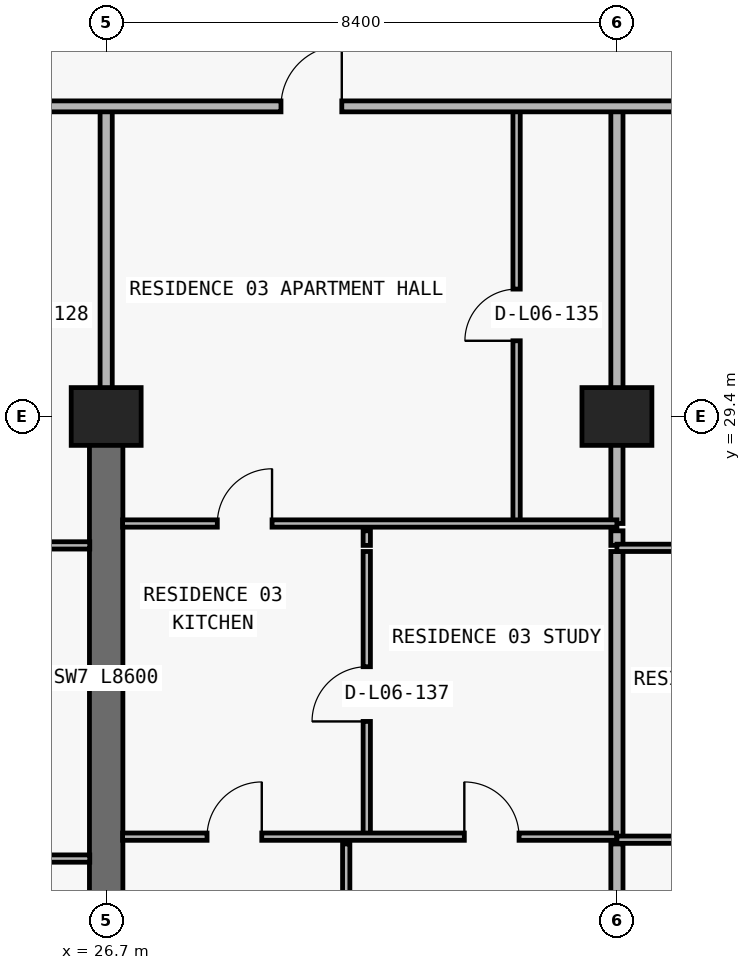
"""IFC4 building model, lengths in metres.
Left out: names, types, materials, properties, quantities, classifications, styles, units other than length and angle.
Written with IfcOpenShell. Run it as: python <this file> out.ifc"""

import sys

from ifc_helpers import new_model, si_unit, direction, frame, frame_2d, origin, origin_2d, place, context, subcontext, project, spatial, rectangle, extrude, element, fill, save


model = new_model("IFC4")
c1 = context("Model", 3, precision=1e-05, world=origin(), true_north=direction((0.0, 1.0)))
c2 = subcontext(c1, "Body", "Model", "MODEL_VIEW")
j1 = project(units=[si_unit("LENGTHUNIT", "METRE"), si_unit("PLANEANGLEUNIT", "RADIAN")], contexts=[c1])
p1 = place(None, origin())
s1 = spatial("IfcSite", under=j1, at=p1, CompositionType="ELEMENT")
p2 = place(p1, origin())
s2 = spatial("IfcBuilding", under=s1, at=p2, CompositionType="ELEMENT")
p3 = place(p2, frame((0.0, 0.0, 30.0)))
s3 = spatial("IfcBuildingStorey", under=s2, at=p3, CompositionType="ELEMENT", Elevation=30.0)
for number, where, z_axis, x_axis in (
    (1, (26.7, 29.4, 0.0), (0.0, 0.0, 1.0), (1.0, 0.0, 0.0)),
    (2, (35.1, 29.4, 0.0), (0.0, 0.0, 1.0), (1.0, 0.0, 0.0)),
):
    element("IfcColumn", number, at=place(p3, frame(where, z_axis=z_axis, x_axis=x_axis)), inside=s3, PredefinedType="COLUMN", context=c2, shape_type="SweptSolid", body=[
        extrude(rectangle(XDim=1.15, YDim=0.95, at=origin_2d()), origin(), (0.0, 0.0, 1.0), 3.05),
    ])
p4 = place(p3, frame((26.7, 20.8, 0.0), z_axis=(0.0, 0.0, 1.0), x_axis=(0.0, 1.0, 0.0)))
e3 = element("IfcWall", 3, at=p4, inside=s3, PredefinedType="SHEAR", context=c2, shape_type="SweptSolid", body=[
    extrude(rectangle(XDim=8.6, YDim=0.55, at=frame_2d((4.3, 0.0))), origin(), (0.0, 0.0, 1.0), 3.05),
])
p5 = place(p3, frame((26.7, 29.405, 0.0), z_axis=(0.0, 0.0, 1.0), x_axis=(0.0, 1.0, 0.0)))
e4 = element("IfcWall", 4, at=p5, inside=s3, PredefinedType="PARTITIONING", context=c2, shape_type="SweptSolid", body=[
    extrude(rectangle(XDim=5.095, YDim=0.2, at=frame_2d((2.547, 0.0))), origin(), (0.0, 0.0, 1.0), 2.335),
])
p6 = place(p3, frame((30.648, 6.24, 0.0), z_axis=(0.0, 0.0, 1.0), x_axis=(0.0, 1.0, 0.0)))
e5 = element("IfcWall", 5, at=p6, inside=s3, PredefinedType="PARTITIONING", context=c2, shape_type="SweptSolid", body=[
    extrude(rectangle(XDim=16.13, YDim=0.12, at=frame_2d((8.065, 0.0))), origin(), (0.0, 0.0, 1.0), 3.05),
])
p7 = place(p3, frame((30.986, 22.49, 0.0), z_axis=(0.0, 0.0, 1.0), x_axis=(0.0, 1.0, 0.0)))
e6 = element("IfcWall", 6, at=p7, inside=s3, PredefinedType="PARTITIONING", context=c2, shape_type="SweptSolid", body=[
    extrude(rectangle(XDim=4.69, YDim=0.12, at=frame_2d((2.345, 0.0))), origin(), (0.0, 0.0, 1.0), 3.05),
])
p8 = place(p7, frame((1.895, 0.0, 0.0)))
e7 = element("IfcOpeningElement", 7, at=p8, cuts=e6, PredefinedType="OPENING", context=c2, shape_type="SweptSolid", body=[
    extrude(rectangle(XDim=0.9, YDim=2.15, at=frame_2d((0.45, 1.075))), frame((0.0, 0.07, 0.0), z_axis=(0.0, -1.0, 0.0), x_axis=(1.0, 0.0, 0.0)), (0.0, 0.0, 1.0), 0.14),
])
p9 = place(p3, frame((30.986, 27.28, 0.0), z_axis=(0.0, 0.0, 1.0), x_axis=(0.0, 1.0, 0.0)))
e8 = element("IfcWall", 8, at=p9, inside=s3, PredefinedType="PARTITIONING", context=c2, shape_type="SweptSolid", body=[
    extrude(rectangle(XDim=0.24, YDim=0.12, at=frame_2d((0.12, 0.0))), origin(), (0.0, 0.0, 1.0), 3.05),
])
p10 = place(p3, frame((33.45, 27.64, 0.0), z_axis=(0.0, 0.0, 1.0), x_axis=(0.0, 1.0, 0.0)))
e9 = element("IfcWall", 9, at=p10, inside=s3, PredefinedType="PARTITIONING", context=c2, shape_type="SweptSolid", body=[
    extrude(rectangle(XDim=6.86, YDim=0.12, at=frame_2d((3.43, 0.0))), origin(), (0.0, 0.0, 1.0), 3.05),
])
p11 = place(p10, frame((3.005, 0.0, 0.0)))
e10 = element("IfcOpeningElement", 10, at=p11, cuts=e9, PredefinedType="OPENING", context=c2, shape_type="SweptSolid", body=[
    extrude(rectangle(XDim=0.85, YDim=2.1, at=frame_2d((0.425, 1.05))), frame((0.0, 0.07, 0.0), z_axis=(0.0, -1.0, 0.0), x_axis=(1.0, 0.0, 0.0)), (0.0, 0.0, 1.0), 0.14),
])
p12 = place(p3, frame((35.1, 6.24, 0.0), z_axis=(0.0, 0.0, 1.0), x_axis=(0.0, 1.0, 0.0)))
e11 = element("IfcWall", 11, at=p12, inside=s3, PredefinedType="PARTITIONING", context=c2, shape_type="SweptSolid", body=[
    extrude(rectangle(XDim=16.13, YDim=0.2, at=frame_2d((8.065, 0.0))), origin(), (0.0, 0.0, 1.0), 2.11),
])
p13 = place(p3, frame((35.1, 22.49, 0.0), z_axis=(0.0, 0.0, 1.0), x_axis=(0.0, 1.0, 0.0)))
e12 = element("IfcWall", 12, at=p13, inside=s3, PredefinedType="PARTITIONING", context=c2, shape_type="SweptSolid", body=[
    extrude(rectangle(XDim=4.69, YDim=0.2, at=frame_2d((2.345, 0.0))), origin(), (0.0, 0.0, 1.0), 2.11),
])
p14 = place(p3, frame((35.1, 27.28, 0.0), z_axis=(0.0, 0.0, 1.0), x_axis=(0.0, 1.0, 0.0)))
e13 = element("IfcWall", 13, at=p14, inside=s3, PredefinedType="PARTITIONING", context=c2, shape_type="SweptSolid", body=[
    extrude(rectangle(XDim=0.24, YDim=0.2, at=frame_2d((0.12, 0.0))), origin(), (0.0, 0.0, 1.0), 2.11),
])
p15 = place(p3, frame((35.1, 27.64, 0.0), z_axis=(0.0, 0.0, 1.0), x_axis=(0.0, 1.0, 0.0)))
e14 = element("IfcWall", 14, at=p15, inside=s3, PredefinedType="PARTITIONING", context=c2, shape_type="SweptSolid", body=[
    extrude(rectangle(XDim=6.86, YDim=0.2, at=frame_2d((3.43, 0.0))), origin(), (0.0, 0.0, 1.0), 2.11),
])
p16 = place(p3, frame((18.3, 22.13, 0.0), z_axis=(0.0, 0.0, 1.0), x_axis=(1.0, 0.0, 0.0)))
e15 = element("IfcWall", 15, at=p16, inside=s3, PredefinedType="PARTITIONING", context=c2, shape_type="SweptSolid", body=[
    extrude(rectangle(XDim=8.13, YDim=0.12, at=frame_2d((4.065, 0.0))), origin(), (0.0, 0.0, 1.0), 3.05),
])
p17 = place(p16, frame((1.86, 0.0, 0.0)))
e16 = element("IfcOpeningElement", 16, at=p17, cuts=e15, PredefinedType="OPENING", context=c2, shape_type="SweptSolid", body=[
    extrude(rectangle(XDim=0.9, YDim=2.15, at=frame_2d((0.45, 1.075))), frame((0.0, 0.07, 0.0), z_axis=(0.0, -1.0, 0.0), x_axis=(1.0, 0.0, 0.0)), (0.0, 0.0, 1.0), 0.14),
])
p18 = place(p16, frame((6.008, 0.0, 0.0)))
e17 = element("IfcOpeningElement", 17, at=p18, cuts=e15, PredefinedType="OPENING", context=c2, shape_type="SweptSolid", body=[
    extrude(rectangle(XDim=0.9, YDim=2.15, at=frame_2d((0.45, 1.075))), frame((0.0, 0.07, 0.0), z_axis=(0.0, -1.0, 0.0), x_axis=(1.0, 0.0, 0.0)), (0.0, 0.0, 1.0), 0.14),
])
p19 = place(p3, frame((35.1, 22.44, 0.0), z_axis=(0.0, 0.0, 1.0), x_axis=(1.0, 0.0, 0.0)))
e18 = element("IfcWall", 18, at=p19, inside=s3, PredefinedType="PARTITIONING", context=c2, shape_type="SweptSolid", body=[
    extrude(rectangle(XDim=7.6, YDim=0.12, at=frame_2d((3.8, 0.0))), origin(), (0.0, 0.0, 1.0), 3.05),
])
p20 = place(p19, frame((3.35, 0.0, 0.0)))
e19 = element("IfcOpeningElement", 19, at=p20, cuts=e18, PredefinedType="OPENING", context=c2, shape_type="SweptSolid", body=[
    extrude(rectangle(XDim=0.9, YDim=2.15, at=frame_2d((0.45, 1.075))), frame((0.0, 0.07, 0.0), z_axis=(0.0, -1.0, 0.0), x_axis=(1.0, 0.0, 0.0)), (0.0, 0.0, 1.0), 0.14),
])
p21 = place(p3, frame((26.97, 22.49, 0.0), z_axis=(0.0, 0.0, 1.0), x_axis=(1.0, 0.0, 0.0)))
e20 = element("IfcWall", 20, at=p21, inside=s3, PredefinedType="PARTITIONING", context=c2, shape_type="SweptSolid", body=[
    extrude(rectangle(XDim=8.125, YDim=0.12, at=frame_2d((4.062, 0.0))), origin(), (0.0, 0.0, 1.0), 3.05),
])
p22 = place(p21, frame((1.389, 0.0, 0.0)))
e21 = element("IfcOpeningElement", 21, at=p22, cuts=e20, PredefinedType="OPENING", context=c2, shape_type="SweptSolid", body=[
    extrude(rectangle(XDim=0.9, YDim=2.15, at=frame_2d((0.45, 1.075))), frame((0.0, 0.07, 0.0), z_axis=(0.0, -1.0, 0.0), x_axis=(1.0, 0.0, 0.0)), (0.0, 0.0, 1.0), 0.14),
])
p23 = place(p21, frame((5.621, 0.0, 0.0)))
e22 = element("IfcOpeningElement", 22, at=p23, cuts=e20, PredefinedType="OPENING", context=c2, shape_type="SweptSolid", body=[
    extrude(rectangle(XDim=0.9, YDim=2.15, at=frame_2d((0.45, 1.075))), frame((0.0, 0.07, 0.0), z_axis=(0.0, -1.0, 0.0), x_axis=(1.0, 0.0, 0.0)), (0.0, 0.0, 1.0), 0.14),
])
p24 = place(p3, frame((35.1, 27.24, 0.0), z_axis=(0.0, 0.0, 1.0), x_axis=(1.0, 0.0, 0.0)))
e23 = element("IfcWall", 23, at=p24, inside=s3, PredefinedType="PARTITIONING", context=c2, shape_type="SweptSolid", body=[
    extrude(rectangle(XDim=7.595, YDim=0.12, at=frame_2d((3.797, 0.0))), origin(), (0.0, 0.0, 1.0), 3.05),
])
p25 = place(p24, frame((2.6, 0.0, 0.0)))
e24 = element("IfcOpeningElement", 24, at=p25, cuts=e23, PredefinedType="OPENING", context=c2, shape_type="SweptSolid", body=[
    extrude(rectangle(XDim=0.9, YDim=2.15, at=frame_2d((0.45, 1.075))), frame((0.0, 0.07, 0.0), z_axis=(0.0, -1.0, 0.0), x_axis=(1.0, 0.0, 0.0)), (0.0, 0.0, 1.0), 0.14),
])
p26 = place(p3, frame((18.3, 27.28, 0.0), z_axis=(0.0, 0.0, 1.0), x_axis=(1.0, 0.0, 0.0)))
e25 = element("IfcWall", 25, at=p26, inside=s3, PredefinedType="PARTITIONING", context=c2, shape_type="SweptSolid", body=[
    extrude(rectangle(XDim=8.13, YDim=0.12, at=frame_2d((4.065, 0.0))), origin(), (0.0, 0.0, 1.0), 3.05),
])
p27 = place(p26, frame((1.943, 0.0, 0.0)))
e26 = element("IfcOpeningElement", 26, at=p27, cuts=e25, PredefinedType="OPENING", context=c2, shape_type="SweptSolid", body=[
    extrude(rectangle(XDim=0.9, YDim=2.15, at=frame_2d((0.45, 1.075))), frame((0.0, 0.07, 0.0), z_axis=(0.0, -1.0, 0.0), x_axis=(1.0, 0.0, 0.0)), (0.0, 0.0, 1.0), 0.14),
])
p28 = place(p3, frame((26.97, 27.64, 0.0), z_axis=(0.0, 0.0, 1.0), x_axis=(1.0, 0.0, 0.0)))
e27 = element("IfcWall", 27, at=p28, inside=s3, PredefinedType="PARTITIONING", context=c2, shape_type="SweptSolid", body=[
    extrude(rectangle(XDim=8.13, YDim=0.12, at=frame_2d((4.065, 0.0))), origin(), (0.0, 0.0, 1.0), 3.05),
])
p29 = place(p28, frame((1.558, 0.0, 0.0)))
e28 = element("IfcOpeningElement", 28, at=p29, cuts=e27, PredefinedType="OPENING", context=c2, shape_type="SweptSolid", body=[
    extrude(rectangle(XDim=0.9, YDim=2.15, at=frame_2d((0.45, 1.075))), frame((0.0, 0.07, 0.0), z_axis=(0.0, -1.0, 0.0), x_axis=(1.0, 0.0, 0.0)), (0.0, 0.0, 1.0), 0.14),
])
p30 = place(p3, frame((5.105, 34.5, 0.0), z_axis=(0.0, 0.0, 1.0), x_axis=(1.0, 0.0, 0.0)))
e29 = element("IfcWall", 29, at=p30, inside=s3, PredefinedType="PARTITIONING", context=c2, shape_type="SweptSolid", body=[
    extrude(rectangle(XDim=50.781, YDim=0.18, at=frame_2d((25.391, 0.0))), origin(), (0.0, 0.0, 1.0), 3.05),
])
p31 = place(p30, frame((7.67, 0.0, 0.0)))
e30 = element("IfcOpeningElement", 30, at=p31, cuts=e29, PredefinedType="OPENING", context=c2, shape_type="SweptSolid", body=[
    extrude(rectangle(XDim=1.0, YDim=2.2, at=frame_2d((0.5, 1.1))), frame((0.0, 0.1, 0.0), z_axis=(0.0, -1.0, 0.0), x_axis=(1.0, 0.0, 0.0)), (0.0, 0.0, 1.0), 0.2),
])
p32 = place(p30, frame((16.07, 0.0, 0.0)))
e31 = element("IfcOpeningElement", 31, at=p32, cuts=e29, PredefinedType="OPENING", context=c2, shape_type="SweptSolid", body=[
    extrude(rectangle(XDim=1.0, YDim=2.2, at=frame_2d((0.5, 1.1))), frame((0.0, 0.1, 0.0), z_axis=(0.0, -1.0, 0.0), x_axis=(1.0, 0.0, 0.0)), (0.0, 0.0, 1.0), 0.2),
])
p33 = place(p30, frame((24.47, 0.0, 0.0)))
e32 = element("IfcOpeningElement", 32, at=p33, cuts=e29, PredefinedType="OPENING", context=c2, shape_type="SweptSolid", body=[
    extrude(rectangle(XDim=1.0, YDim=2.2, at=frame_2d((0.5, 1.1))), frame((0.0, 0.1, 0.0), z_axis=(0.0, -1.0, 0.0), x_axis=(1.0, 0.0, 0.0)), (0.0, 0.0, 1.0), 0.2),
])
p34 = place(p30, frame((32.545, 0.0, 0.0)))
e33 = element("IfcOpeningElement", 33, at=p34, cuts=e29, PredefinedType="OPENING", context=c2, shape_type="SweptSolid", body=[
    extrude(rectangle(XDim=1.0, YDim=2.2, at=frame_2d((0.5, 1.1))), frame((0.0, 0.1, 0.0), z_axis=(0.0, -1.0, 0.0), x_axis=(1.0, 0.0, 0.0)), (0.0, 0.0, 1.0), 0.2),
])
p35 = place(p30, frame((47.888, 0.0, 0.0)))
e34 = element("IfcOpeningElement", 34, at=p35, cuts=e29, PredefinedType="OPENING", context=c2, shape_type="SweptSolid", body=[
    extrude(rectangle(XDim=1.0, YDim=2.2, at=frame_2d((0.5, 1.1))), frame((0.0, 0.1, 0.0), z_axis=(0.0, -1.0, 0.0), x_axis=(1.0, 0.0, 0.0)), (0.0, 0.0, 1.0), 0.2),
])
p36 = place(p33, origin())
e35 = element("IfcDoor", 35, at=p36, inside=s3, OperationType="SINGLE_SWING_RIGHT", PredefinedType="DOOR", context=c2, shape_type="SweptSolid", body=[
    extrude(rectangle(XDim=1.0, YDim=2.2, at=frame_2d((0.5, 1.1))), frame((0.0, 0.025, 0.0), z_axis=(0.0, -1.0, 0.0), x_axis=(1.0, 0.0, 0.0)), (0.0, 0.0, 1.0), 0.05),
])
fill(e32, e35)
p37 = place(p11, origin())
e36 = element("IfcDoor", 36, at=p37, inside=s3, OperationType="SINGLE_SWING_LEFT", PredefinedType="DOOR", context=c2, shape_type="SweptSolid", body=[
    extrude(rectangle(XDim=0.85, YDim=2.1, at=frame_2d((0.425, 1.05))), frame((0.0, 0.025, 0.0), z_axis=(0.0, -1.0, 0.0), x_axis=(1.0, 0.0, 0.0)), (0.0, 0.0, 1.0), 0.05),
])
fill(e10, e36)
p38 = place(p29, origin())
e37 = element("IfcDoor", 37, at=p38, inside=s3, OperationType="SINGLE_SWING_RIGHT", PredefinedType="DOOR", context=c2, shape_type="SweptSolid", body=[
    extrude(rectangle(XDim=0.9, YDim=2.15, at=frame_2d((0.45, 1.075))), frame((0.0, 0.025, 0.0), z_axis=(0.0, -1.0, 0.0), x_axis=(1.0, 0.0, 0.0)), (0.0, 0.0, 1.0), 0.05),
])
fill(e28, e37)
p39 = place(p8, origin())
e38 = element("IfcDoor", 38, at=p39, inside=s3, OperationType="SINGLE_SWING_LEFT", PredefinedType="DOOR", context=c2, shape_type="SweptSolid", body=[
    extrude(rectangle(XDim=0.9, YDim=2.15, at=frame_2d((0.45, 1.075))), frame((0.0, 0.025, 0.0), z_axis=(0.0, -1.0, 0.0), x_axis=(1.0, 0.0, 0.0)), (0.0, 0.0, 1.0), 0.05),
])
fill(e7, e38)
p40 = place(p22, origin())
e39 = element("IfcDoor", 39, at=p40, inside=s3, OperationType="SINGLE_SWING_RIGHT", PredefinedType="DOOR", context=c2, shape_type="SweptSolid", body=[
    extrude(rectangle(XDim=0.9, YDim=2.15, at=frame_2d((0.45, 1.075))), frame((0.0, 0.025, 0.0), z_axis=(0.0, -1.0, 0.0), x_axis=(1.0, 0.0, 0.0)), (0.0, 0.0, 1.0), 0.05),
])
fill(e21, e39)
p41 = place(p23, origin())
e40 = element("IfcDoor", 40, at=p41, inside=s3, OperationType="SINGLE_SWING_LEFT", PredefinedType="DOOR", context=c2, shape_type="SweptSolid", body=[
    extrude(rectangle(XDim=0.9, YDim=2.15, at=frame_2d((0.45, 1.075))), frame((0.0, 0.025, 0.0), z_axis=(0.0, -1.0, 0.0), x_axis=(1.0, 0.0, 0.0)), (0.0, 0.0, 1.0), 0.05),
])
fill(e22, e40)
save(model, sys.argv[1])
